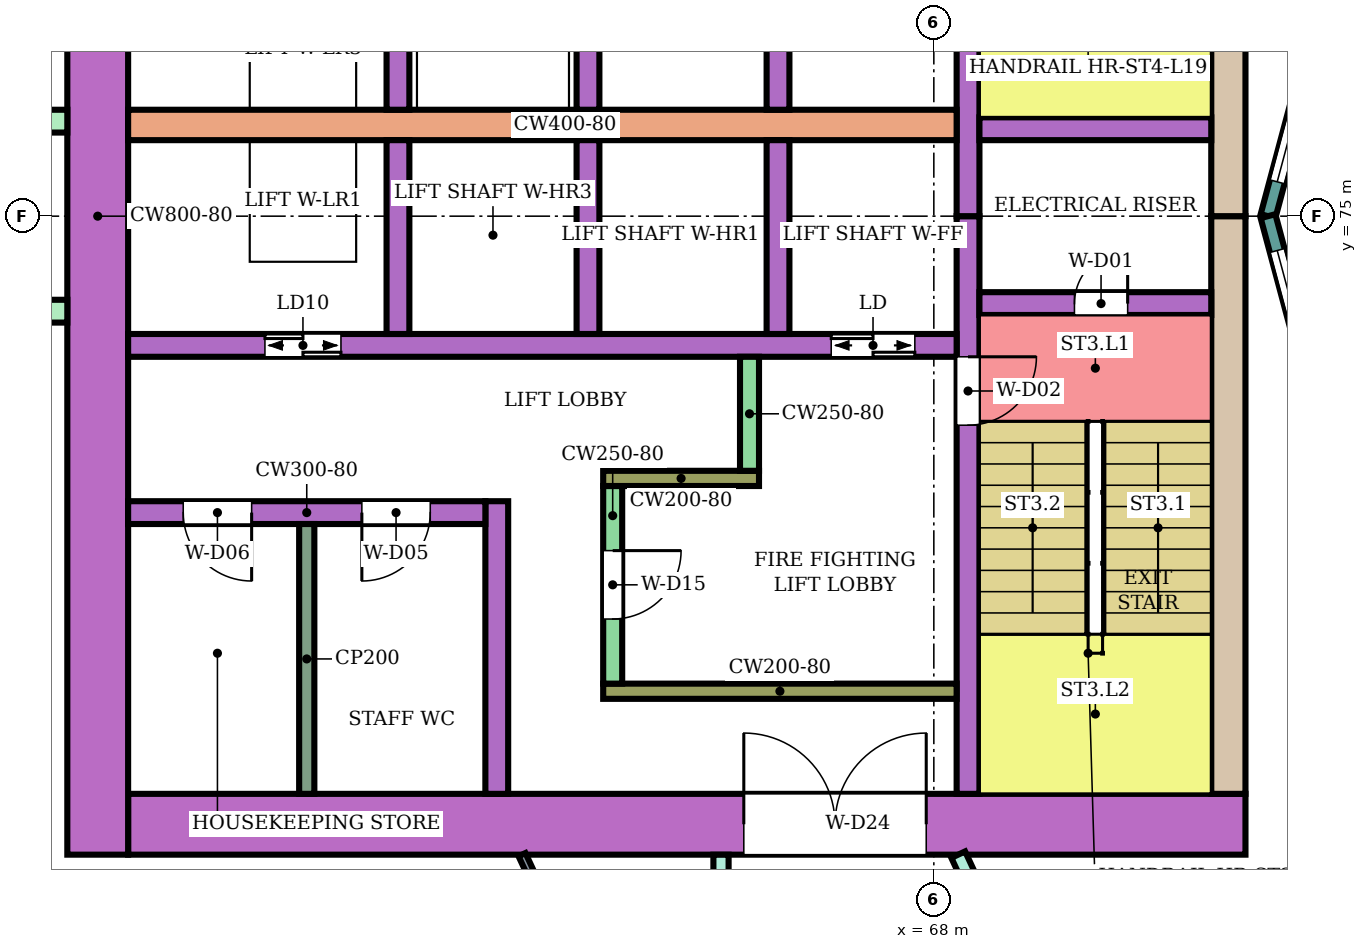
"""IFC4 building model, lengths in metres.
Left out: names, types, materials, properties, quantities, classifications, styles, units other than length and angle.
Written with IfcOpenShell. Run it as: python <this file> out.ifc"""

import sys

from ifc_helpers import new_model, si_unit, direction, frame, frame_2d, origin, place, context, subcontext, project, spatial, rectangle, extrude, element, fill, save


model = new_model("IFC4")
c1 = context("Model", 3, precision=1e-05, world=origin(), true_north=direction((0.0, 1.0)))
c2 = subcontext(c1, "Body", "Model", "MODEL_VIEW")
j1 = project(units=[si_unit("LENGTHUNIT", "METRE"), si_unit("PLANEANGLEUNIT", "RADIAN")], contexts=[c1])
p1 = place(None, origin())
s1 = spatial("IfcSite", under=j1, at=p1, CompositionType="ELEMENT")
p2 = place(p1, origin())
s2 = spatial("IfcBuilding", under=s1, at=p2, CompositionType="ELEMENT")
p3 = place(p2, frame((0.0, 0.0, 86.2)))
s3 = spatial("IfcBuildingStorey", under=s2, at=p3, CompositionType="ELEMENT", Elevation=86.2)
p4 = place(p3, frame((72.1, 67.0, 0.0), z_axis=(0.0, 0.0, 1.0), x_axis=(-1.0, 0.0, 0.0)))
e1 = element("IfcWall", 1, at=p4, inside=s3, PredefinedType="SHEAR", context=c2, shape_type="SweptSolid", body=[
    extrude(rectangle(XDim=14.7, YDim=0.8, at=frame_2d((7.35, 0.0))), origin(), (0.0, 0.0, 1.0), 3.48),
])
p5 = place(p4, frame((4.2, 0.0, 0.0)))
e2 = element("IfcOpeningElement", 2, at=p5, cuts=e1, PredefinedType="OPENING", context=c2, shape_type="SweptSolid", body=[
    extrude(rectangle(XDim=2.4, YDim=2.4, at=frame_2d((1.2, 1.2))), frame((0.0, 0.41, 0.0), z_axis=(0.0, -1.0, 0.0), x_axis=(1.0, 0.0, 0.0)), (0.0, 0.0, 1.0), 0.82),
])
for number, where, z_axis, x_axis in (
    (3, (71.875, 75.0, 0.0), (0.0, 0.0, 1.0), (0.0, -1.0, 0.0)),
    (4, (71.875, 82.6, 0.0), (0.0, 0.0, 1.0), (0.0, -1.0, 0.0)),
):
    element("IfcWall", number, at=place(p3, frame(where, z_axis=z_axis, x_axis=x_axis)), inside=s3, PredefinedType="SHEAR", context=c2, shape_type="SweptSolid", body=[
        extrude(rectangle(XDim=7.6, YDim=0.45, at=frame_2d((3.8, 0.0))), origin(), (0.0, 0.0, 1.0), 3.48),
    ])
p6 = place(p3, frame((57.0, 83.4, 0.0), z_axis=(0.0, 0.0, 1.0), x_axis=(0.0, -1.0, 0.0)))
e5 = element("IfcWall", 5, at=p6, inside=s3, PredefinedType="SHEAR", context=c2, shape_type="SweptSolid", body=[
    extrude(rectangle(XDim=16.8, YDim=0.8, at=frame_2d((8.4, 0.0))), origin(), (0.0, 0.0, 1.0), 3.48),
])
p7 = place(p3, frame((68.45, 75.0, 0.0), z_axis=(0.0, 0.0, 1.0), x_axis=(0.0, -1.0, 0.0)))
e6 = element("IfcWall", 6, at=p7, inside=s3, PredefinedType="SHEAR", context=c2, shape_type="SweptSolid", body=[
    extrude(rectangle(XDim=7.6, YDim=0.3, at=frame_2d((3.8, 0.0))), origin(), (0.0, 0.0, 1.0), 3.48),
])
p8 = place(p7, frame((1.85, 0.0, 0.0)))
e7 = element("IfcOpeningElement", 7, at=p8, cuts=e6, PredefinedType="OPENING", context=c2, shape_type="SweptSolid", body=[
    extrude(rectangle(XDim=0.9, YDim=2.1, at=frame_2d((0.45, 1.05))), frame((0.0, 0.16, 0.0), z_axis=(0.0, -1.0, 0.0), x_axis=(1.0, 0.0, 0.0)), (0.0, 0.0, 1.0), 0.32),
])
p9 = place(p3, frame((68.45, 82.6, 0.0), z_axis=(0.0, 0.0, 1.0), x_axis=(0.0, -1.0, 0.0)))
e8 = element("IfcWall", 8, at=p9, inside=s3, PredefinedType="SHEAR", context=c2, shape_type="SweptSolid", body=[
    extrude(rectangle(XDim=7.6, YDim=0.3, at=frame_2d((3.8, 0.0))), origin(), (0.0, 0.0, 1.0), 3.48),
])
p10 = place(p9, frame((0.25, 0.0, 0.0)))
e9 = element("IfcOpeningElement", 9, at=p10, cuts=e8, PredefinedType="OPENING", context=c2, shape_type="SweptSolid", body=[
    extrude(rectangle(XDim=0.9, YDim=2.1, at=frame_2d((0.45, 1.05))), frame((0.0, 0.16, 0.0), z_axis=(0.0, -1.0, 0.0), x_axis=(1.0, 0.0, 0.0)), (0.0, 0.0, 1.0), 0.32),
])
p11 = place(p3, frame((71.65, 73.85, 0.0), z_axis=(0.0, 0.0, 1.0), x_axis=(-1.0, 0.0, 0.0)))
e10 = element("IfcWall", 10, at=p11, inside=s3, PredefinedType="SHEAR", context=c2, shape_type="SweptSolid", body=[
    extrude(rectangle(XDim=3.05, YDim=0.3, at=frame_2d((1.525, 0.0))), origin(), (0.0, 0.0, 1.0), 3.48),
])
p12 = place(p11, frame((1.1, 0.0, 0.0)))
e11 = element("IfcOpeningElement", 11, at=p12, cuts=e10, PredefinedType="OPENING", context=c2, shape_type="SweptSolid", body=[
    extrude(rectangle(XDim=0.7, YDim=2.0, at=frame_2d((0.35, 1.0))), frame((0.0, 0.16, 0.0), z_axis=(0.0, -1.0, 0.0), x_axis=(1.0, 0.0, 0.0)), (0.0, 0.0, 1.0), 0.32),
])
p13 = place(p3, frame((71.65, 76.15, 0.0), z_axis=(0.0, 0.0, 1.0), x_axis=(-1.0, 0.0, 0.0)))
e12 = element("IfcWall", 12, at=p13, inside=s3, PredefinedType="SHEAR", context=c2, shape_type="SweptSolid", body=[
    extrude(rectangle(XDim=3.05, YDim=0.3, at=frame_2d((1.525, 0.0))), origin(), (0.0, 0.0, 1.0), 3.48),
])
p14 = place(p3, frame((68.3, 73.3, 0.0), z_axis=(0.0, 0.0, 1.0), x_axis=(-1.0, 0.0, 0.0)))
e13 = element("IfcWall", 13, at=p14, inside=s3, PredefinedType="SHEAR", context=c2, shape_type="SweptSolid", body=[
    extrude(rectangle(XDim=10.9, YDim=0.3, at=frame_2d((5.45, 0.0))), origin(), (0.0, 0.0, 1.0), 3.48),
])
p15 = place(p14, frame((0.55, 0.0, 0.0)))
e14 = element("IfcOpeningElement", 14, at=p15, cuts=e13, PredefinedType="OPENING", context=c2, shape_type="SweptSolid", body=[
    extrude(rectangle(XDim=1.1, YDim=2.1, at=frame_2d((0.55, 1.05))), frame((0.0, 0.16, 0.0), z_axis=(0.0, -1.0, 0.0), x_axis=(1.0, 0.0, 0.0)), (0.0, 0.0, 1.0), 0.32),
])
p16 = place(p14, frame((8.1, 0.0, 0.0)))
e15 = element("IfcOpeningElement", 15, at=p16, cuts=e13, PredefinedType="OPENING", context=c2, shape_type="SweptSolid", body=[
    extrude(rectangle(XDim=1.0, YDim=2.1, at=frame_2d((0.5, 1.05))), frame((0.0, 0.16, 0.0), z_axis=(0.0, -1.0, 0.0), x_axis=(1.0, 0.0, 0.0)), (0.0, 0.0, 1.0), 0.32),
])
p17 = place(p3, frame((68.3, 76.2, 0.0), z_axis=(0.0, 0.0, 1.0), x_axis=(-1.0, 0.0, 0.0)))
e16 = element("IfcWall", 16, at=p17, inside=s3, PredefinedType="SHEAR", context=c2, shape_type="SweptSolid", body=[
    extrude(rectangle(XDim=10.9, YDim=0.4, at=frame_2d((5.45, 0.0))), origin(), (0.0, 0.0, 1.0), 3.48),
])
for number, where, z_axis, x_axis in (
    (17, (65.95, 76.0, 0.0), (0.0, 0.0, 1.0), (0.0, -1.0, 0.0)),
    (18, (63.45, 76.0, 0.0), (0.0, 0.0, 1.0), (0.0, -1.0, 0.0)),
    (19, (60.95, 76.0, 0.0), (0.0, 0.0, 1.0), (0.0, -1.0, 0.0)),
    (20, (65.95, 78.95, 0.0), (0.0, 0.0, 1.0), (0.0, -1.0, 0.0)),
    (21, (63.45, 78.95, 0.0), (0.0, 0.0, 1.0), (0.0, -1.0, 0.0)),
    (22, (60.95, 78.95, 0.0), (0.0, 0.0, 1.0), (0.0, -1.0, 0.0)),
):
    element("IfcWall", number, at=place(p3, frame(where, z_axis=z_axis, x_axis=x_axis)), inside=s3, PredefinedType="SHEAR", context=c2, shape_type="SweptSolid", body=[
        extrude(rectangle(XDim=2.55, YDim=0.3, at=frame_2d((1.275, 0.0))), origin(), (0.0, 0.0, 1.0), 3.48),
    ])
p18 = place(p3, frame((68.3, 68.75, 0.0), z_axis=(0.0, 0.0, 1.0), x_axis=(-1.0, 0.0, 0.0)))
e23 = element("IfcWall", 23, at=p18, inside=s3, PredefinedType="SHEAR", context=c2, shape_type="SweptSolid", body=[
    extrude(rectangle(XDim=4.65, YDim=0.2, at=frame_2d((2.325, 0.0))), origin(), (0.0, 0.0, 1.0), 3.48),
])
p19 = place(p3, frame((63.775, 71.45, 0.0), z_axis=(0.0, 0.0, 1.0), x_axis=(0.0, -1.0, 0.0)))
e24 = element("IfcWall", 24, at=p19, inside=s3, PredefinedType="SHEAR", context=c2, shape_type="SweptSolid", body=[
    extrude(rectangle(XDim=2.6, YDim=0.25, at=frame_2d((1.3, 0.0))), origin(), (0.0, 0.0, 1.0), 3.48),
])
p20 = place(p19, frame((0.85, 0.0, 0.0)))
e25 = element("IfcOpeningElement", 25, at=p20, cuts=e24, PredefinedType="OPENING", context=c2, shape_type="SweptSolid", body=[
    extrude(rectangle(XDim=0.9, YDim=2.1, at=frame_2d((0.45, 1.05))), frame((0.0, 0.135, 0.0), z_axis=(0.0, -1.0, 0.0), x_axis=(1.0, 0.0, 0.0)), (0.0, 0.0, 1.0), 0.27),
])
p21 = place(p3, frame((65.7, 71.55, 0.0), z_axis=(0.0, 0.0, 1.0), x_axis=(-1.0, 0.0, 0.0)))
e26 = element("IfcWall", 26, at=p21, inside=s3, PredefinedType="SHEAR", context=c2, shape_type="SweptSolid", body=[
    extrude(rectangle(XDim=2.05, YDim=0.2, at=frame_2d((1.025, 0.0))), origin(), (0.0, 0.0, 1.0), 3.48),
])
p22 = place(p3, frame((65.575, 73.15, 0.0), z_axis=(0.0, 0.0, 1.0), x_axis=(0.0, -1.0, 0.0)))
e27 = element("IfcWall", 27, at=p22, inside=s3, PredefinedType="SHEAR", context=c2, shape_type="SweptSolid", body=[
    extrude(rectangle(XDim=1.5, YDim=0.25, at=frame_2d((0.75, 0.0))), origin(), (0.0, 0.0, 1.0), 3.48),
])
p23 = place(p3, frame((62.25, 71.25, 0.0), z_axis=(0.0, 0.0, 1.0), x_axis=(0.0, -1.0, 0.0)))
e28 = element("IfcWall", 28, at=p23, inside=s3, PredefinedType="SHEAR", context=c2, shape_type="SweptSolid", body=[
    extrude(rectangle(XDim=3.85, YDim=0.3, at=frame_2d((1.925, 0.0))), origin(), (0.0, 0.0, 1.0), 3.48),
])
p24 = place(p3, frame((62.1, 71.1, 0.0), z_axis=(0.0, 0.0, 1.0), x_axis=(-1.0, 0.0, 0.0)))
e29 = element("IfcWall", 29, at=p24, inside=s3, PredefinedType="SHEAR", context=c2, shape_type="SweptSolid", body=[
    extrude(rectangle(XDim=4.7, YDim=0.3, at=frame_2d((2.35, 0.0))), origin(), (0.0, 0.0, 1.0), 3.48),
])
p25 = place(p24, frame((0.725, 0.0, 0.0)))
e30 = element("IfcOpeningElement", 30, at=p25, cuts=e29, PredefinedType="OPENING", context=c2, shape_type="SweptSolid", body=[
    extrude(rectangle(XDim=0.9, YDim=2.1, at=frame_2d((0.45, 1.05))), frame((0.0, 0.16, 0.0), z_axis=(0.0, -1.0, 0.0), x_axis=(1.0, 0.0, 0.0)), (0.0, 0.0, 1.0), 0.32),
])
p26 = place(p24, frame((3.075, 0.0, 0.0)))
e31 = element("IfcOpeningElement", 31, at=p26, cuts=e29, PredefinedType="OPENING", context=c2, shape_type="SweptSolid", body=[
    extrude(rectangle(XDim=0.9, YDim=2.1, at=frame_2d((0.45, 1.05))), frame((0.0, 0.16, 0.0), z_axis=(0.0, -1.0, 0.0), x_axis=(1.0, 0.0, 0.0)), (0.0, 0.0, 1.0), 0.32),
])
for number, where, z_axis, x_axis in (
    (32, (56.6, 76.25, 0.0), (0.0, 0.0, 1.0), (-1.0, 0.0, 0.0)),
    (33, (56.6, 73.75, 0.0), (0.0, 0.0, 1.0), (-1.0, 0.0, 0.0)),
):
    element("IfcWall", number, at=place(p3, frame(where, z_axis=z_axis, x_axis=x_axis)), inside=s3, PredefinedType="NOTDEFINED", context=c2, shape_type="SweptSolid", body=[
        extrude(rectangle(XDim=2.416, YDim=0.3, at=frame_2d((1.208, 0.0))), origin(), (0.0, 0.0, 1.0), 3.8),
    ])
p27 = place(p3, frame((73.415, 78.802, 0.0), z_axis=(0.0, 0.0, 1.0), x_axis=(-0.258789828301, -0.965933654434, 0.0)))
e34 = element("IfcWall", 34, at=p27, inside=s3, PredefinedType="NOTDEFINED", context=c2, shape_type="SweptSolid", body=[
    extrude(rectangle(XDim=3.936, YDim=0.2, at=frame_2d((1.968, 0.0))), origin(), (0.0, 0.0, 1.0), 3.8),
])
p28 = place(p27, frame((0.468, 0.0, 0.9)))
e35 = element("IfcOpeningElement", 35, at=p28, cuts=e34, PredefinedType="OPENING", context=c2, shape_type="SweptSolid", body=[
    extrude(rectangle(XDim=3.0, YDim=2.3, at=frame_2d((1.5, 1.15))), frame((0.0, 0.11, 0.0), z_axis=(0.0, -1.0, 0.0), x_axis=(1.0, 0.0, 0.0)), (0.0, 0.0, 1.0), 0.22),
])
p29 = place(p3, frame((72.396, 75.0, 0.0), z_axis=(0.0, 0.0, 1.0), x_axis=(0.258789828301, -0.965933654434, 0.0)))
e36 = element("IfcWall", 36, at=p29, inside=s3, PredefinedType="NOTDEFINED", context=c2, shape_type="SweptSolid", body=[
    extrude(rectangle(XDim=3.936, YDim=0.2, at=frame_2d((1.968, 0.0))), origin(), (0.0, 0.0, 1.0), 3.8),
])
p30 = place(p29, frame((0.468, 0.0, 0.9)))
e37 = element("IfcOpeningElement", 37, at=p30, cuts=e36, PredefinedType="OPENING", context=c2, shape_type="SweptSolid", body=[
    extrude(rectangle(XDim=3.0, YDim=2.3, at=frame_2d((1.5, 1.15))), frame((0.0, 0.11, 0.0), z_axis=(0.0, -1.0, 0.0), x_axis=(1.0, 0.0, 0.0)), (0.0, 0.0, 1.0), 0.22),
])
p31 = place(p3, frame((65.2, 65.2, 0.0), z_axis=(0.0, 0.0, 1.0), x_axis=(0.0, 1.0, 0.0)))
e38 = element("IfcWall", 38, at=p31, inside=s3, PredefinedType="PARTITIONING", context=c2, shape_type="SweptSolid", body=[
    extrude(rectangle(XDim=1.399, YDim=0.2, at=frame_2d((0.7, 0.0))), origin(), (0.0, 0.0, 1.0), 3.35),
])
p32 = place(p3, frame((68.321, 66.6, 0.0), z_axis=(0.0, 0.0, 1.0), x_axis=(0.421914092414, -0.906635813666, 0.0)))
e39 = element("IfcWall", 39, at=p32, inside=s3, PredefinedType="PARTITIONING", context=c2, shape_type="SweptSolid", body=[
    extrude(rectangle(XDim=7.459, YDim=0.2, at=frame_2d((3.73, 0.0))), origin(), (0.0, 0.0, 1.0), 3.35),
])
p33 = place(p32, frame((0.7, 0.0, 0.0)))
e40 = element("IfcOpeningElement", 40, at=p33, cuts=e39, PredefinedType="OPENING", context=c2, shape_type="SweptSolid", body=[
    extrude(rectangle(XDim=1.0, YDim=2.1, at=frame_2d((0.5, 1.05))), frame((0.0, 0.11, 0.0), z_axis=(0.0, -1.0, 0.0), x_axis=(1.0, 0.0, 0.0)), (0.0, 0.0, 1.0), 0.22),
])
p34 = place(p3, frame((71.459, 60.218, 0.0), z_axis=(0.0, 0.0, 1.0), x_axis=(0.500232027118, 0.865891401416, 0.0)))
e41 = element("IfcWall", 41, at=p34, inside=s3, PredefinedType="PARTITIONING", context=c2, shape_type="SweptSolid", body=[
    extrude(rectangle(XDim=9.372, YDim=0.2, at=frame_2d((4.686, 0.0))), origin(), (0.0, 0.0, 1.0), 3.35),
])
p35 = place(p3, frame((62.582, 66.6, 0.0), z_axis=(0.0, 0.0, 1.0), x_axis=(0.422283870085, -0.906463641337, 0.0)))
e42 = element("IfcWall", 42, at=p35, inside=s3, PredefinedType="PARTITIONING", context=c2, shape_type="SweptSolid", body=[
    extrude(rectangle(XDim=6.666, YDim=0.1, at=frame_2d((3.333, 0.0))), origin(), (0.0, 0.0, 1.0), 3.35),
])
p36 = place(p35, frame((1.953, 0.0, 0.0)))
e43 = element("IfcOpeningElement", 43, at=p36, cuts=e42, PredefinedType="OPENING", context=c2, shape_type="SweptSolid", body=[
    extrude(rectangle(XDim=0.9, YDim=2.1, at=frame_2d((0.45, 1.05))), frame((0.0, 0.06, 0.0), z_axis=(0.0, -1.0, 0.0), x_axis=(1.0, 0.0, 0.0)), (0.0, 0.0, 1.0), 0.12),
])
p37 = place(p3, frame((59.75, 70.95, 0.0), z_axis=(0.0, 0.0, 1.0), x_axis=(0.0, -1.0, 0.0)))
e44 = element("IfcWall", 44, at=p37, inside=s3, PredefinedType="PARTITIONING", context=c2, shape_type="SweptSolid", body=[
    extrude(rectangle(XDim=3.55, YDim=0.2, at=frame_2d((1.775, 0.0))), origin(), (0.0, 0.0, 1.0), 3.48),
])
p38 = place(p28, origin())
e45 = element("IfcWindow", 45, at=p38, inside=s3, PartitioningType="SINGLE_PANEL", PredefinedType="WINDOW", context=c2, shape_type="SweptSolid", body=[
    extrude(rectangle(XDim=3.0, YDim=2.3, at=frame_2d((1.5, 1.15))), frame((0.0, 0.03, 0.0), z_axis=(0.0, -1.0, 0.0), x_axis=(1.0, 0.0, 0.0)), (0.0, 0.0, 1.0), 0.06),
])
fill(e35, e45)
p39 = place(p30, origin())
e46 = element("IfcWindow", 46, at=p39, inside=s3, PartitioningType="SINGLE_PANEL", PredefinedType="WINDOW", context=c2, shape_type="SweptSolid", body=[
    extrude(rectangle(XDim=3.0, YDim=2.3, at=frame_2d((1.5, 1.15))), frame((0.0, 0.03, 0.0), z_axis=(0.0, -1.0, 0.0), x_axis=(1.0, 0.0, 0.0)), (0.0, 0.0, 1.0), 0.06),
])
fill(e37, e46)
p40 = place(p12, frame((0.7, 0.0, 0.0), z_axis=(0.0, 0.0, 1.0), x_axis=(-1.0, 0.0, 0.0)))
e47 = element("IfcDoor", 47, at=p40, inside=s3, OperationType="SINGLE_SWING_RIGHT", PredefinedType="DOOR", context=c2, shape_type="SweptSolid", body=[
    extrude(rectangle(XDim=0.7, YDim=2.0, at=frame_2d((0.35, 1.0))), frame((0.0, 0.025, 0.0), z_axis=(0.0, -1.0, 0.0), x_axis=(1.0, 0.0, 0.0)), (0.0, 0.0, 1.0), 0.05),
])
fill(e11, e47)
p41 = place(p8, origin())
e48 = element("IfcDoor", 48, at=p41, inside=s3, OperationType="SINGLE_SWING_LEFT", PredefinedType="DOOR", context=c2, shape_type="SweptSolid", body=[
    extrude(rectangle(XDim=0.9, YDim=2.1, at=frame_2d((0.45, 1.05))), frame((0.0, 0.025, 0.0), z_axis=(0.0, -1.0, 0.0), x_axis=(1.0, 0.0, 0.0)), (0.0, 0.0, 1.0), 0.05),
])
fill(e7, e48)
p42 = place(p15, origin())
e49 = element("IfcDoor", 49, at=p42, inside=s3, OperationType="DOUBLE_DOOR_SLIDING", PredefinedType="DOOR", context=c2, shape_type="SweptSolid", body=[
    extrude(rectangle(XDim=1.1, YDim=2.1, at=frame_2d((0.55, 1.05))), frame((0.0, 0.025, 0.0), z_axis=(0.0, -1.0, 0.0), x_axis=(1.0, 0.0, 0.0)), (0.0, 0.0, 1.0), 0.05),
])
fill(e14, e49)
p43 = place(p16, origin())
e50 = element("IfcDoor", 50, at=p43, inside=s3, OperationType="DOUBLE_DOOR_SLIDING", PredefinedType="DOOR", context=c2, shape_type="SweptSolid", body=[
    extrude(rectangle(XDim=1.0, YDim=2.1, at=frame_2d((0.5, 1.05))), frame((0.0, 0.025, 0.0), z_axis=(0.0, -1.0, 0.0), x_axis=(1.0, 0.0, 0.0)), (0.0, 0.0, 1.0), 0.05),
])
fill(e15, e50)
p44 = place(p20, origin())
e51 = element("IfcDoor", 51, at=p44, inside=s3, OperationType="SINGLE_SWING_LEFT", PredefinedType="DOOR", context=c2, shape_type="SweptSolid", body=[
    extrude(rectangle(XDim=0.9, YDim=2.1, at=frame_2d((0.45, 1.05))), frame((0.0, 0.025, 0.0), z_axis=(0.0, -1.0, 0.0), x_axis=(1.0, 0.0, 0.0)), (0.0, 0.0, 1.0), 0.05),
])
fill(e25, e51)
p45 = place(p25, origin())
e52 = element("IfcDoor", 52, at=p45, inside=s3, OperationType="SINGLE_SWING_RIGHT", PredefinedType="DOOR", context=c2, shape_type="SweptSolid", body=[
    extrude(rectangle(XDim=0.9, YDim=2.1, at=frame_2d((0.45, 1.05))), frame((0.0, 0.025, 0.0), z_axis=(0.0, -1.0, 0.0), x_axis=(1.0, 0.0, 0.0)), (0.0, 0.0, 1.0), 0.05),
])
fill(e30, e52)
p46 = place(p26, origin())
e53 = element("IfcDoor", 53, at=p46, inside=s3, OperationType="SINGLE_SWING_LEFT", PredefinedType="DOOR", context=c2, shape_type="SweptSolid", body=[
    extrude(rectangle(XDim=0.9, YDim=2.1, at=frame_2d((0.45, 1.05))), frame((0.0, 0.025, 0.0), z_axis=(0.0, -1.0, 0.0), x_axis=(1.0, 0.0, 0.0)), (0.0, 0.0, 1.0), 0.05),
])
fill(e31, e53)
p47 = place(p5, frame((2.4, 0.0, 0.0), z_axis=(0.0, 0.0, 1.0), x_axis=(-1.0, 0.0, 0.0)))
e54 = element("IfcDoor", 54, at=p47, inside=s3, OperationType="DOUBLE_DOOR_SINGLE_SWING", PredefinedType="DOOR", context=c2, shape_type="SweptSolid", body=[
    extrude(rectangle(XDim=2.4, YDim=2.4, at=frame_2d((1.2, 1.2))), frame((0.0, 0.025, 0.0), z_axis=(0.0, -1.0, 0.0), x_axis=(1.0, 0.0, 0.0)), (0.0, 0.0, 1.0), 0.05),
])
fill(e2, e54)
save(model, sys.argv[1])
